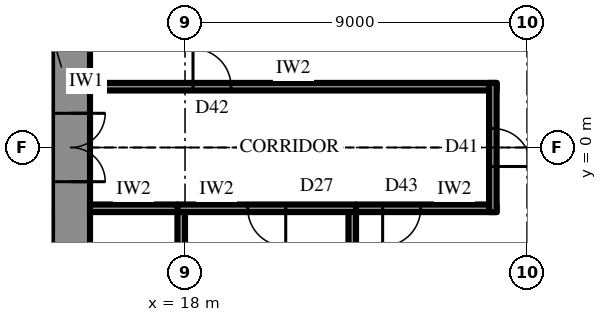
"""IFC4 building model, lengths in metres.
Left out: names, types, materials, properties, quantities, classifications, styles, units other than length and angle.
Written with IfcOpenShell. Run it as: python <this file> out.ifc"""

import sys

from ifc_helpers import new_model, si_unit, direction, frame, frame_2d, origin, place, context, subcontext, project, spatial, rectangle, extrude, element, fill, save


model = new_model("IFC4")
c1 = context("Model", 3, precision=1e-05, world=origin(), true_north=direction((0.0, 1.0)))
c2 = subcontext(c1, "Body", "Model", "MODEL_VIEW")
j1 = project(units=[si_unit("LENGTHUNIT", "METRE"), si_unit("PLANEANGLEUNIT", "RADIAN")], contexts=[c1])
p1 = place(None, origin())
s1 = spatial("IfcSite", under=j1, at=p1, CompositionType="ELEMENT")
p2 = place(p1, origin())
s2 = spatial("IfcBuilding", under=s1, at=p2, CompositionType="ELEMENT")
p3 = place(p2, frame((0.0, 0.0, 270.1)))
s3 = spatial("IfcBuildingStorey", under=s2, at=p3, CompositionType="ELEMENT", Elevation=270.1)
p4 = place(p3, frame((15.0, -10.7, 0.0), z_axis=(0.0, 0.0, 1.0), x_axis=(0.0, 1.0, 0.0)))
e1 = element("IfcWall", 1, at=p4, inside=s3, PredefinedType="SHEAR", context=c2, shape_type="SweptSolid", body=[
    extrude(rectangle(XDim=21.4, YDim=1.0, at=frame_2d((10.7, 0.0))), origin(), (0.0, 0.0, 1.0), 4.2),
])
p5 = place(p4, frame((9.8, 0.0, 0.0)))
e2 = element("IfcOpeningElement", 2, at=p5, cuts=e1, PredefinedType="OPENING", context=c2, shape_type="SweptSolid", body=[
    extrude(rectangle(XDim=1.8, YDim=2.4, at=frame_2d((0.9, 1.2))), frame((0.0, 0.51, 0.0), z_axis=(0.0, -1.0, 0.0), x_axis=(1.0, 0.0, 0.0)), (0.0, 0.0, 1.0), 1.02),
])
p6 = place(p3, frame((12.3, 2.0, 0.0), z_axis=(0.0, 0.0, 1.0), x_axis=(1.0, 0.0, 0.0)))
e3 = element("IfcWall", 3, at=p6, inside=s3, PredefinedType="SHEAR", context=c2, shape_type="SweptSolid", body=[
    extrude(rectangle(XDim=2.2, YDim=0.5, at=frame_2d((1.1, 0.0))), origin(), (0.0, 0.0, 1.0), 4.2),
])
p7 = place(p6, frame((0.8, 0.0, 0.0)))
e4 = element("IfcOpeningElement", 4, at=p7, cuts=e3, PredefinedType="OPENING", context=c2, shape_type="SweptSolid", body=[
    extrude(rectangle(XDim=0.9, YDim=2.2, at=frame_2d((0.45, 1.1))), frame((0.0, 0.26, 0.0), z_axis=(0.0, -1.0, 0.0), x_axis=(1.0, 0.0, 0.0)), (0.0, 0.0, 1.0), 0.52),
])
p8 = place(p3, frame((17.8, -1.6, 0.0), z_axis=(0.0, 0.0, 1.0), x_axis=(1.0, 0.0, 0.0)))
e5 = element("IfcWall", 5, at=p8, inside=s3, PredefinedType="PARTITIONING", context=c2, shape_type="SweptSolid", body=[
    extrude(rectangle(XDim=4.7, YDim=0.2, at=frame_2d((2.35, 0.0))), origin(), (0.0, 0.0, 1.0), 4.0),
])
p9 = place(p8, frame((1.85, 0.0, 0.0)))
e6 = element("IfcOpeningElement", 6, at=p9, cuts=e5, PredefinedType="OPENING", context=c2, shape_type="SweptSolid", body=[
    extrude(rectangle(XDim=1.0, YDim=2.2, at=frame_2d((0.5, 1.1))), frame((0.0, 0.11, 0.0), z_axis=(0.0, -1.0, 0.0), x_axis=(1.0, 0.0, 0.0)), (0.0, 0.0, 1.0), 0.22),
])
for number, where, z_axis, x_axis in (
    (7, (17.9, -1.7, 0.0), (0.0, 0.0, 1.0), (0.0, -1.0, 0.0)),
    (8, (22.4, -1.7, 0.0), (0.0, 0.0, 1.0), (0.0, -1.0, 0.0)),
):
    element("IfcWall", number, at=place(p3, frame(where, z_axis=z_axis, x_axis=x_axis)), inside=s3, PredefinedType="PARTITIONING", context=c2, shape_type="SweptSolid", body=[
        extrude(rectangle(XDim=4.3, YDim=0.2, at=frame_2d((2.15, 0.0))), origin(), (0.0, 0.0, 1.0), 4.0),
    ])
p10 = place(p3, frame((15.5, 1.6, 0.0), z_axis=(0.0, 0.0, 1.0), x_axis=(1.0, 0.0, 0.0)))
e9 = element("IfcWall", 9, at=p10, inside=s3, PredefinedType="PARTITIONING", context=c2, shape_type="SweptSolid", body=[
    extrude(rectangle(XDim=10.7, YDim=0.2, at=frame_2d((5.35, 0.0))), origin(), (0.0, 0.0, 1.0), 4.0),
])
p11 = place(p10, frame((2.71, 0.0, 0.0)))
e10 = element("IfcOpeningElement", 10, at=p11, cuts=e9, PredefinedType="OPENING", context=c2, shape_type="SweptSolid", body=[
    extrude(rectangle(XDim=1.0, YDim=2.2, at=frame_2d((0.5, 1.1))), frame((0.0, 0.11, 0.0), z_axis=(0.0, -1.0, 0.0), x_axis=(1.0, 0.0, 0.0)), (0.0, 0.0, 1.0), 0.22),
])
p12 = place(p3, frame((15.5, -1.6, 0.0), z_axis=(0.0, 0.0, 1.0), x_axis=(1.0, 0.0, 0.0)))
e11 = element("IfcWall", 11, at=p12, inside=s3, PredefinedType="PARTITIONING", context=c2, shape_type="SweptSolid", body=[
    extrude(rectangle(XDim=2.3, YDim=0.2, at=frame_2d((1.15, 0.0))), origin(), (0.0, 0.0, 1.0), 4.0),
])
p13 = place(p3, frame((22.5, -1.6, 0.0), z_axis=(0.0, 0.0, 1.0), x_axis=(1.0, 0.0, 0.0)))
e12 = element("IfcWall", 12, at=p13, inside=s3, PredefinedType="PARTITIONING", context=c2, shape_type="SweptSolid", body=[
    extrude(rectangle(XDim=3.7, YDim=0.2, at=frame_2d((1.85, 0.0))), origin(), (0.0, 0.0, 1.0), 4.0),
])
p14 = place(p13, frame((0.7, 0.0, 0.0)))
e13 = element("IfcOpeningElement", 13, at=p14, cuts=e12, PredefinedType="OPENING", context=c2, shape_type="SweptSolid", body=[
    extrude(rectangle(XDim=1.0, YDim=2.2, at=frame_2d((0.5, 1.1))), frame((0.0, 0.11, 0.0), z_axis=(0.0, -1.0, 0.0), x_axis=(1.0, 0.0, 0.0)), (0.0, 0.0, 1.0), 0.22),
])
p15 = place(p3, frame((26.1, -1.7, 0.0), z_axis=(0.0, 0.0, 1.0), x_axis=(0.0, 1.0, 0.0)))
e14 = element("IfcWall", 14, at=p15, inside=s3, PredefinedType="PARTITIONING", context=c2, shape_type="SweptSolid", body=[
    extrude(rectangle(XDim=3.4, YDim=0.2, at=frame_2d((1.7, 0.0))), origin(), (0.0, 0.0, 1.0), 4.0),
])
p16 = place(p15, frame((1.2, 0.0, 0.0)))
e15 = element("IfcOpeningElement", 15, at=p16, cuts=e14, PredefinedType="OPENING", context=c2, shape_type="SweptSolid", body=[
    extrude(rectangle(XDim=1.0, YDim=2.2, at=frame_2d((0.5, 1.1))), frame((0.0, 0.11, 0.0), z_axis=(0.0, -1.0, 0.0), x_axis=(1.0, 0.0, 0.0)), (0.0, 0.0, 1.0), 0.22),
])
p17 = place(p5, frame((1.8, 0.0, 0.0), z_axis=(0.0, 0.0, 1.0), x_axis=(-1.0, 0.0, 0.0)))
e16 = element("IfcDoor", 16, at=p17, inside=s3, OperationType="DOUBLE_DOOR_SINGLE_SWING", PredefinedType="DOOR", context=c2, shape_type="SweptSolid", body=[
    extrude(rectangle(XDim=1.8, YDim=2.4, at=frame_2d((0.9, 1.2))), frame((0.0, 0.025, 0.0), z_axis=(0.0, -1.0, 0.0), x_axis=(1.0, 0.0, 0.0)), (0.0, 0.0, 1.0), 0.05),
])
fill(e2, e16)
p18 = place(p9, frame((1.0, 0.0, 0.0), z_axis=(0.0, 0.0, 1.0), x_axis=(-1.0, 0.0, 0.0)))
e17 = element("IfcDoor", 17, at=p18, inside=s3, OperationType="SINGLE_SWING_RIGHT", PredefinedType="DOOR", context=c2, shape_type="SweptSolid", body=[
    extrude(rectangle(XDim=1.0, YDim=2.2, at=frame_2d((0.5, 1.1))), frame((0.0, 0.025, 0.0), z_axis=(0.0, -1.0, 0.0), x_axis=(1.0, 0.0, 0.0)), (0.0, 0.0, 1.0), 0.05),
])
fill(e6, e17)
p19 = place(p11, origin())
e18 = element("IfcDoor", 18, at=p19, inside=s3, OperationType="SINGLE_SWING_RIGHT", PredefinedType="DOOR", context=c2, shape_type="SweptSolid", body=[
    extrude(rectangle(XDim=1.0, YDim=2.2, at=frame_2d((0.5, 1.1))), frame((0.0, 0.025, 0.0), z_axis=(0.0, -1.0, 0.0), x_axis=(1.0, 0.0, 0.0)), (0.0, 0.0, 1.0), 0.05),
])
fill(e10, e18)
p20 = place(p14, frame((1.0, 0.0, 0.0), z_axis=(0.0, 0.0, 1.0), x_axis=(-1.0, 0.0, 0.0)))
e19 = element("IfcDoor", 19, at=p20, inside=s3, OperationType="SINGLE_SWING_LEFT", PredefinedType="DOOR", context=c2, shape_type="SweptSolid", body=[
    extrude(rectangle(XDim=1.0, YDim=2.2, at=frame_2d((0.5, 1.1))), frame((0.0, 0.025, 0.0), z_axis=(0.0, -1.0, 0.0), x_axis=(1.0, 0.0, 0.0)), (0.0, 0.0, 1.0), 0.05),
])
fill(e13, e19)
p21 = place(p16, frame((1.0, 0.0, 0.0), z_axis=(0.0, 0.0, 1.0), x_axis=(-1.0, 0.0, 0.0)))
e20 = element("IfcDoor", 20, at=p21, inside=s3, OperationType="SINGLE_SWING_LEFT", PredefinedType="DOOR", context=c2, shape_type="SweptSolid", body=[
    extrude(rectangle(XDim=1.0, YDim=2.2, at=frame_2d((0.5, 1.1))), frame((0.0, 0.025, 0.0), z_axis=(0.0, -1.0, 0.0), x_axis=(1.0, 0.0, 0.0)), (0.0, 0.0, 1.0), 0.05),
])
fill(e15, e20)
save(model, sys.argv[1])
